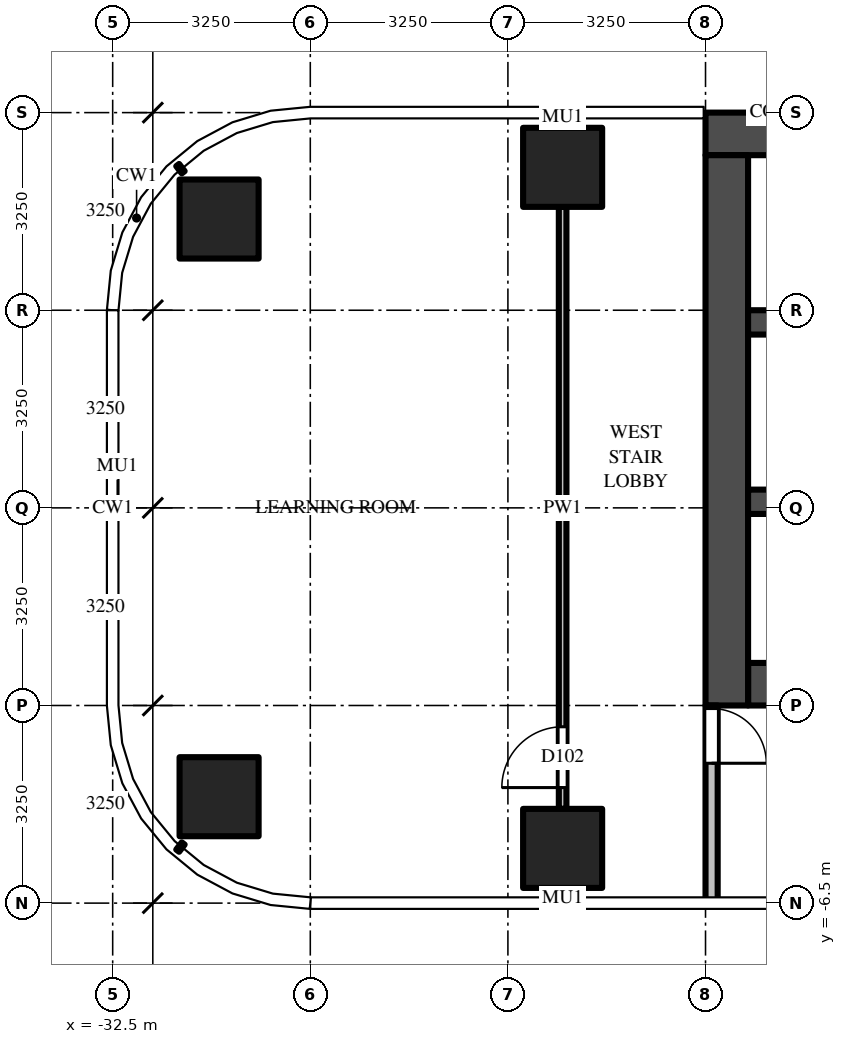
"""IFC4 building model, lengths in metres.
Left out: names, types, materials, properties, quantities, classifications, styles, units other than length and angle.
Written with IfcOpenShell. Run it as: python <this file> out.ifc"""

import sys

from ifc_helpers import new_model, si_unit, direction, frame, frame_2d, origin, origin_2d, place, context, subcontext, project, spatial, rectangle, extrude, source, transform, mapped, element, fill, save


model = new_model("IFC4")
c1 = context("Model", 3, precision=1e-05, world=origin(), true_north=direction((0.0, 1.0)))
c2 = subcontext(c1, "Body", "Model", "MODEL_VIEW")
j1 = project(units=[si_unit("LENGTHUNIT", "METRE"), si_unit("PLANEANGLEUNIT", "RADIAN")], contexts=[c1])
p1 = place(None, origin())
s1 = spatial("IfcSite", under=j1, at=p1, CompositionType="ELEMENT")
p2 = place(p1, origin())
s2 = spatial("IfcBuilding", under=s1, at=p2, CompositionType="ELEMENT")
p3 = place(p2, frame((0.0, 0.0, 120.0)))
s3 = spatial("IfcBuildingStorey", under=s2, at=p3, CompositionType="ELEMENT", Elevation=120.0)
m1 = source(origin(), c2, "Body", "SweptSolid", [
    extrude(rectangle(XDim=1.3, YDim=1.3, at=origin_2d()), origin(), (0.0, 0.0, 1.0), 4.5),
])
for number, where, z_axis, x_axis in (
    (1, (-25.1, -5.6, 0.0), (0.0, 0.0, 1.0), (1.0, 0.0, 0.0)),
    (2, (-30.75, -4.75, 0.0), (0.0, 0.0, 1.0), (1.0, 0.0, 0.0)),
    (3, (-25.1, 5.6, 0.0), (0.0, 0.0, 1.0), (1.0, 0.0, 0.0)),
    (4, (-30.75, 4.75, 0.0), (0.0, 0.0, 1.0), (1.0, 0.0, 0.0)),
):
    element("IfcColumn", number, at=place(p3, frame(where, z_axis=z_axis, x_axis=x_axis)), inside=s3, PredefinedType="COLUMN", context=c2, shape_type="MappedRepresentation", body=[
        mapped(m1, transform((0.0, 0.0, 0.0))),
    ])
m2 = source(origin(), c2, "Body", "SweptSolid", [
    extrude(rectangle(XDim=16.5, YDim=0.7, at=frame_2d((8.25, 0.0))), origin(), (0.0, 0.0, 1.0), 4.25),
])
p4 = place(p3, frame((-6.25, 6.15, 0.0), z_axis=(0.0, 0.0, 1.0), x_axis=(-1.0, 0.0, 0.0)))
e5 = element("IfcWall", 5, at=p4, inside=s3, PredefinedType="SHEAR", context=c2, shape_type="MappedRepresentation", body=[
    mapped(m2, transform((0.0, 0.0, 0.0))),
])
m3 = source(origin(), c2, "Body", "SweptSolid", [
    extrude(rectangle(XDim=14.85, YDim=0.7, at=frame_2d((7.425, 0.0))), origin(), (0.0, 0.0, 1.0), 4.25),
])
p5 = place(p3, frame((-7.2, -2.9, 0.0), z_axis=(0.0, 0.0, 1.0), x_axis=(-1.0, 0.0, 0.0)))
e6 = element("IfcWall", 6, at=p5, inside=s3, PredefinedType="SHEAR", context=c2, shape_type="MappedRepresentation", body=[
    mapped(m3, transform((0.0, 0.0, 0.0))),
])
m4 = source(origin(), c2, "Body", "SweptSolid", [
    extrude(rectangle(XDim=1.3, YDim=2.1, at=frame_2d((0.65, 1.05))), frame((0.0, 0.36, 0.0), z_axis=(0.0, -1.0, 0.0), x_axis=(1.0, 0.0, 0.0)), (0.0, 0.0, 1.0), 0.72),
])
p6 = place(p5, frame((12.2, 0.0, 0.0)))
e7 = element("IfcOpeningElement", 7, at=p6, cuts=e6, PredefinedType="OPENING", context=c2, shape_type="MappedRepresentation", body=[
    mapped(m4, transform((0.0, 0.0, 0.0))),
])
m5 = source(origin(), c2, "Body", "SweptSolid", [
    extrude(rectangle(XDim=1.2, YDim=2.1, at=frame_2d((0.6, 1.05))), frame((0.0, 0.36, 0.0), z_axis=(0.0, -1.0, 0.0), x_axis=(1.0, 0.0, 0.0)), (0.0, 0.0, 1.0), 0.72),
])
p7 = place(p5, frame((9.85, 0.0, 0.0)))
e8 = element("IfcOpeningElement", 8, at=p7, cuts=e6, PredefinedType="OPENING", context=c2, shape_type="MappedRepresentation", body=[
    mapped(m5, transform((0.0, 0.0, 0.0))),
])
m6 = source(origin(), c2, "Body", "SweptSolid", [
    extrude(rectangle(XDim=1.0, YDim=2.1, at=frame_2d((0.5, 1.05))), frame((0.0, 0.36, 0.0), z_axis=(0.0, -1.0, 0.0), x_axis=(1.0, 0.0, 0.0)), (0.0, 0.0, 1.0), 0.72),
])
p8 = place(p5, frame((7.9, 0.0, 0.0)))
e9 = element("IfcOpeningElement", 9, at=p8, cuts=e6, PredefinedType="OPENING", context=c2, shape_type="MappedRepresentation", body=[
    mapped(m6, transform((0.0, 0.0, 0.0))),
])
m7 = source(origin(), c2, "Body", "SweptSolid", [
    extrude(rectangle(XDim=0.8, YDim=2.1, at=frame_2d((0.4, 1.05))), frame((0.0, 0.36, 0.0), z_axis=(0.0, -1.0, 0.0), x_axis=(1.0, 0.0, 0.0)), (0.0, 0.0, 1.0), 0.72),
])
p9 = place(p5, frame((0.113, 0.0, 0.0)))
e10 = element("IfcOpeningElement", 10, at=p9, cuts=e6, PredefinedType="OPENING", context=c2, shape_type="MappedRepresentation", body=[
    mapped(m7, transform((0.0, 0.0, 0.0))),
])
p10 = place(p5, frame((1.288, 0.0, 0.0)))
e11 = element("IfcOpeningElement", 11, at=p10, cuts=e6, PredefinedType="OPENING", context=c2, shape_type="MappedRepresentation", body=[
    mapped(m7, transform((0.0, 0.0, 0.0))),
])
p11 = place(p5, frame((2.712, 0.0, 0.0)))
e12 = element("IfcOpeningElement", 12, at=p11, cuts=e6, PredefinedType="OPENING", context=c2, shape_type="MappedRepresentation", body=[
    mapped(m7, transform((0.0, 0.0, 0.0))),
])
p12 = place(p5, frame((3.887, 0.0, 0.0)))
e13 = element("IfcOpeningElement", 13, at=p12, cuts=e6, PredefinedType="OPENING", context=c2, shape_type="MappedRepresentation", body=[
    mapped(m7, transform((0.0, 0.0, 0.0))),
])
p13 = place(p5, frame((5.312, 0.0, 0.0)))
e14 = element("IfcOpeningElement", 14, at=p13, cuts=e6, PredefinedType="OPENING", context=c2, shape_type="MappedRepresentation", body=[
    mapped(m7, transform((0.0, 0.0, 0.0))),
])
p14 = place(p5, frame((6.488, 0.0, 0.0)))
e15 = element("IfcOpeningElement", 15, at=p14, cuts=e6, PredefinedType="OPENING", context=c2, shape_type="MappedRepresentation", body=[
    mapped(m7, transform((0.0, 0.0, 0.0))),
])
m8 = source(origin(), c2, "Body", "SweptSolid", [
    extrude(rectangle(XDim=9.05, YDim=0.7, at=frame_2d((4.525, 0.0))), origin(), (0.0, 0.0, 1.0), 4.25),
])
p15 = place(p3, frame((-22.4, 5.8, 0.0), z_axis=(0.0, 0.0, 1.0), x_axis=(0.0, -1.0, 0.0)))
e16 = element("IfcWall", 16, at=p15, inside=s3, PredefinedType="SHEAR", context=c2, shape_type="MappedRepresentation", body=[
    mapped(m8, transform((0.0, 0.0, 0.0))),
])
m9 = source(origin(), c2, "Body", "SweptSolid", [
    extrude(rectangle(XDim=14.85, YDim=0.4, at=frame_2d((7.425, 0.0))), origin(), (0.0, 0.0, 1.0), 4.25),
])
p16 = place(p3, frame((-7.2, 0.1, 0.0), z_axis=(0.0, 0.0, 1.0), x_axis=(-1.0, 0.0, 0.0)))
e17 = element("IfcWall", 17, at=p16, inside=s3, PredefinedType="SHEAR", context=c2, shape_type="MappedRepresentation", body=[
    mapped(m9, transform((0.0, 0.0, 0.0))),
])
m10 = source(origin(), c2, "Body", "SweptSolid", [
    extrude(rectangle(XDim=1.0, YDim=2.1, at=frame_2d((0.5, 1.05))), frame((0.0, 0.21, 0.0), z_axis=(0.0, -1.0, 0.0), x_axis=(1.0, 0.0, 0.0)), (0.0, 0.0, 1.0), 0.42),
])
p17 = place(p16, frame((7.9, 0.0, 0.0)))
e18 = element("IfcOpeningElement", 18, at=p17, cuts=e17, PredefinedType="OPENING", context=c2, shape_type="MappedRepresentation", body=[
    mapped(m10, transform((0.0, 0.0, 0.0))),
])
m11 = source(origin(), c2, "Body", "SweptSolid", [
    extrude(rectangle(XDim=5.7, YDim=0.4, at=frame_2d((2.85, 0.0))), origin(), (0.0, 0.0, 1.0), 4.25),
])
p18 = place(p3, frame((-16.35, 3.05, 0.0), z_axis=(0.0, 0.0, 1.0), x_axis=(-1.0, 0.0, 0.0)))
e19 = element("IfcWall", 19, at=p18, inside=s3, PredefinedType="SHEAR", context=c2, shape_type="MappedRepresentation", body=[
    mapped(m11, transform((0.0, 0.0, 0.0))),
])
m12 = source(origin(), c2, "Body", "SweptSolid", [
    extrude(rectangle(XDim=3.25, YDim=0.2, at=frame_2d((1.625, 0.0))), origin(), (0.0, 0.0, 1.0), 4.25),
])
p19 = place(p3, frame((-22.65, -3.25, 0.0), z_axis=(0.0, 0.0, 1.0), x_axis=(0.0, -1.0, 0.0)))
e20 = element("IfcWall", 20, at=p19, inside=s3, PredefinedType="PARTITIONING", context=c2, shape_type="MappedRepresentation", body=[
    mapped(m12, transform((0.0, 0.0, 0.0))),
])
m13 = source(origin(), c2, "Body", "SweptSolid", [
    extrude(rectangle(XDim=0.9, YDim=2.1, at=frame_2d((0.45, 1.05))), frame((0.0, 0.11, 0.0), z_axis=(0.0, -1.0, 0.0), x_axis=(1.0, 0.0, 0.0)), (0.0, 0.0, 1.0), 0.22),
])
p20 = place(p19, frame((0.05, 0.0, 0.0)))
e21 = element("IfcOpeningElement", 21, at=p20, cuts=e20, PredefinedType="OPENING", context=c2, shape_type="MappedRepresentation", body=[
    mapped(m13, transform((0.0, 0.0, 0.0))),
])
m14 = source(origin(), c2, "Body", "SweptSolid", [
    extrude(rectangle(XDim=9.9, YDim=0.125, at=frame_2d((4.95, 0.0))), origin(), (0.0, 0.0, 1.0), 3.468),
])
p21 = place(p3, frame((-25.1, -4.95, 0.0), z_axis=(0.0, 0.0, 1.0), x_axis=(0.0, 1.0, 0.0)))
e22 = element("IfcWall", 22, at=p21, inside=s3, PredefinedType="PARTITIONING", context=c2, shape_type="MappedRepresentation", body=[
    mapped(m14, transform((0.0, 0.0, 0.0))),
])
m15 = source(origin(), c2, "Body", "SweptSolid", [
    extrude(rectangle(XDim=1.0, YDim=2.1, at=frame_2d((0.5, 1.05))), frame((0.0, 0.073, 0.0), z_axis=(0.0, -1.0, 0.0), x_axis=(1.0, 0.0, 0.0)), (0.0, 0.0, 1.0), 0.145),
])
p22 = place(p21, frame((0.35, 0.0, 0.0)))
e23 = element("IfcOpeningElement", 23, at=p22, cuts=e22, PredefinedType="OPENING", context=c2, shape_type="MappedRepresentation", body=[
    mapped(m15, transform((0.0, 0.0, 0.0))),
])
m16 = source(origin(), c2, "Body", "SweptSolid", [
    extrude(rectangle(XDim=0.9, YDim=2.1, at=frame_2d((0.45, 1.05))), frame((0.0, 0.025, 0.0), z_axis=(0.0, -1.0, 0.0), x_axis=(1.0, 0.0, 0.0)), (0.0, 0.0, 1.0), 0.05),
])
p23 = place(p20, origin())
e24 = element("IfcDoor", 24, at=p23, inside=s3, OperationType="SINGLE_SWING_RIGHT", PredefinedType="DOOR", context=c2, shape_type="MappedRepresentation", body=[
    mapped(m16, transform((0.0, 0.0, 0.0))),
])
fill(e21, e24)
m17 = source(origin(), c2, "Body", "SweptSolid", [
    extrude(rectangle(XDim=1.0, YDim=2.1, at=frame_2d((0.5, 1.05))), frame((0.0, 0.025, 0.0), z_axis=(0.0, -1.0, 0.0), x_axis=(1.0, 0.0, 0.0)), (0.0, 0.0, 1.0), 0.05),
])
p24 = place(p22, origin())
e25 = element("IfcDoor", 25, at=p24, inside=s3, OperationType="SINGLE_SWING_LEFT", PredefinedType="DOOR", context=c2, shape_type="MappedRepresentation", body=[
    mapped(m17, transform((0.0, 0.0, 0.0))),
])
fill(e23, e25)
save(model, sys.argv[1])
